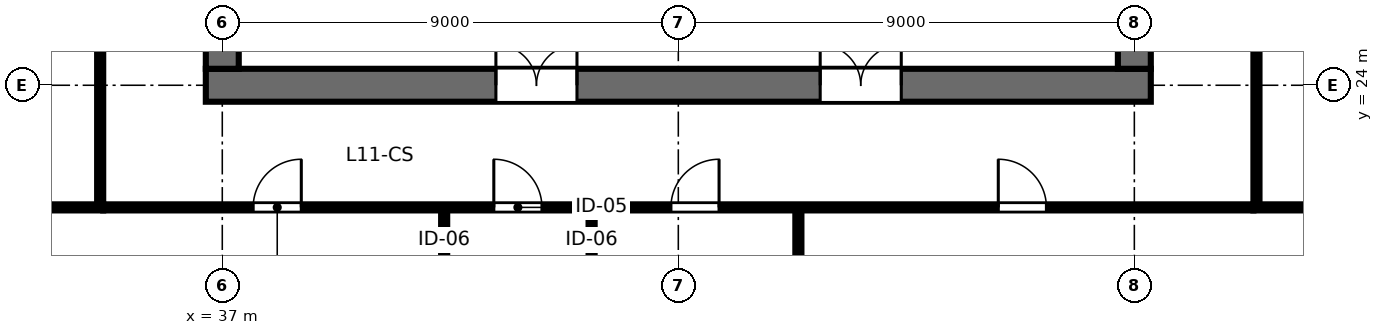
"""IFC4 building model, lengths in metres.
Left out: names, types, materials, properties, quantities, classifications, styles, units other than length and angle.
Written with IfcOpenShell. Run it as: python <this file> out.ifc"""

import sys

from ifc_helpers import new_model, si_unit, direction, frame, frame_2d, origin, place, context, subcontext, project, spatial, rectangle, extrude, element, fill, save


model = new_model("IFC4")
c1 = context("Model", 3, precision=1e-05, world=origin(), true_north=direction((0.0, 1.0)))
c2 = subcontext(c1, "Body", "Model", "MODEL_VIEW")
j1 = project(units=[si_unit("LENGTHUNIT", "METRE"), si_unit("PLANEANGLEUNIT", "RADIAN")], contexts=[c1])
p1 = place(None, origin())
s1 = spatial("IfcSite", under=j1, at=p1, CompositionType="ELEMENT")
p2 = place(p1, origin())
s2 = spatial("IfcBuilding", under=s1, at=p2, CompositionType="ELEMENT")
p3 = place(p2, frame((0.0, 0.0, 46.0)))
s3 = spatial("IfcBuildingStorey", under=s2, at=p3, CompositionType="ELEMENT", Elevation=46.0)
p4 = place(p3, frame((36.675, 24.0, 0.0), z_axis=(0.0, 0.0, 1.0), x_axis=(1.0, 0.0, 0.0)))
e1 = element("IfcWall", 1, at=p4, inside=s3, PredefinedType="SHEAR", context=c2, shape_type="SweptSolid", body=[
    extrude(rectangle(XDim=18.65, YDim=0.65, at=frame_2d((9.325, 0.0))), origin(), (0.0, 0.0, 1.0), 3.36),
])
p5 = place(p4, frame((5.725, 0.0, 0.0)))
e2 = element("IfcOpeningElement", 2, at=p5, cuts=e1, PredefinedType="OPENING", context=c2, shape_type="SweptSolid", body=[
    extrude(rectangle(XDim=1.6, YDim=2.15, at=frame_2d((0.8, 1.075))), frame((0.0, 0.335, 0.0), z_axis=(0.0, -1.0, 0.0), x_axis=(1.0, 0.0, 0.0)), (0.0, 0.0, 1.0), 0.67),
])
p6 = place(p4, frame((12.125, 0.0, 0.0)))
e3 = element("IfcOpeningElement", 3, at=p6, cuts=e1, PredefinedType="OPENING", context=c2, shape_type="SweptSolid", body=[
    extrude(rectangle(XDim=1.6, YDim=2.15, at=frame_2d((0.8, 1.075))), frame((0.0, 0.335, 0.0), z_axis=(0.0, -1.0, 0.0), x_axis=(1.0, 0.0, 0.0)), (0.0, 0.0, 1.0), 0.67),
])
p7 = place(p3, frame((37.0, 24.325, 0.0), z_axis=(0.0, 0.0, 1.0), x_axis=(0.0, 1.0, 0.0)))
e4 = element("IfcWall", 4, at=p7, inside=s3, PredefinedType="SHEAR", context=c2, shape_type="SweptSolid", body=[
    extrude(rectangle(XDim=15.35, YDim=0.65, at=frame_2d((7.675, 0.0))), origin(), (0.0, 0.0, 1.0), 3.36),
])
p8 = place(p7, frame((5.2, 0.0, 0.0)))
e5 = element("IfcOpeningElement", 5, at=p8, cuts=e4, PredefinedType="OPENING", context=c2, shape_type="SweptSolid", body=[
    extrude(rectangle(XDim=1.15, YDim=2.15, at=frame_2d((0.575, 1.075))), frame((0.0, 0.335, 0.0), z_axis=(0.0, -1.0, 0.0), x_axis=(1.0, 0.0, 0.0)), (0.0, 0.0, 1.0), 0.67),
])
p9 = place(p3, frame((55.0, 24.325, 0.0), z_axis=(0.0, 0.0, 1.0), x_axis=(0.0, 1.0, 0.0)))
e6 = element("IfcWall", 6, at=p9, inside=s3, PredefinedType="SHEAR", context=c2, shape_type="SweptSolid", body=[
    extrude(rectangle(XDim=15.35, YDim=0.65, at=frame_2d((7.675, 0.0))), origin(), (0.0, 0.0, 1.0), 3.36),
])
p10 = place(p9, frame((5.2, 0.0, 0.0)))
e7 = element("IfcOpeningElement", 7, at=p10, cuts=e6, PredefinedType="OPENING", context=c2, shape_type="SweptSolid", body=[
    extrude(rectangle(XDim=1.15, YDim=2.15, at=frame_2d((0.575, 1.075))), frame((0.0, 0.335, 0.0), z_axis=(0.0, -1.0, 0.0), x_axis=(1.0, 0.0, 0.0)), (0.0, 0.0, 1.0), 0.67),
])
p11 = place(p3, frame((41.379, 21.59, 0.0), z_axis=(0.0, 0.0, 1.0), x_axis=(0.0, -1.0, 0.0)))
e8 = element("IfcWall", 8, at=p11, inside=s3, PredefinedType="PARTITIONING", context=c2, shape_type="SweptSolid", body=[
    extrude(rectangle(XDim=10.51, YDim=0.12, at=frame_2d((5.255, 0.0))), origin(), (0.0, 0.0, 1.0), 2.43),
])
p12 = place(p11, frame((1.4, 0.0, 0.0)))
e9 = element("IfcOpeningElement", 9, at=p12, cuts=e8, PredefinedType="OPENING", context=c2, shape_type="SweptSolid", body=[
    extrude(rectangle(XDim=0.9, YDim=2.15, at=frame_2d((0.45, 1.075))), frame((0.0, 0.07, 0.0), z_axis=(0.0, -1.0, 0.0), x_axis=(1.0, 0.0, 0.0)), (0.0, 0.0, 1.0), 0.14),
])
p13 = place(p3, frame((44.289, 21.59, 0.0), z_axis=(0.0, 0.0, 1.0), x_axis=(0.0, -1.0, 0.0)))
e10 = element("IfcWall", 10, at=p13, inside=s3, PredefinedType="PARTITIONING", context=c2, shape_type="SweptSolid", body=[
    extrude(rectangle(XDim=10.51, YDim=0.12, at=frame_2d((5.255, 0.0))), origin(), (0.0, 0.0, 1.0), 2.43),
])
p14 = place(p13, frame((1.4, 0.0, 0.0)))
e11 = element("IfcOpeningElement", 11, at=p14, cuts=e10, PredefinedType="OPENING", context=c2, shape_type="SweptSolid", body=[
    extrude(rectangle(XDim=0.9, YDim=2.15, at=frame_2d((0.45, 1.075))), frame((0.0, 0.07, 0.0), z_axis=(0.0, -1.0, 0.0), x_axis=(1.0, 0.0, 0.0)), (0.0, 0.0, 1.0), 0.14),
])
p15 = place(p3, frame((48.37, 21.59, 0.0), z_axis=(0.0, 0.0, 1.0), x_axis=(0.0, -1.0, 0.0)))
e12 = element("IfcWall", 12, at=p15, inside=s3, PredefinedType="PARTITIONING", context=c2, shape_type="SweptSolid", body=[
    extrude(rectangle(XDim=10.51, YDim=0.12, at=frame_2d((5.255, 0.0))), origin(), (0.0, 0.0, 1.0), 2.43),
])
p16 = place(p15, frame((1.4, 0.0, 0.0)))
e13 = element("IfcOpeningElement", 13, at=p16, cuts=e12, PredefinedType="OPENING", context=c2, shape_type="SweptSolid", body=[
    extrude(rectangle(XDim=0.9, YDim=2.15, at=frame_2d((0.45, 1.075))), frame((0.0, 0.07, 0.0), z_axis=(0.0, -1.0, 0.0), x_axis=(1.0, 0.0, 0.0)), (0.0, 0.0, 1.0), 0.14),
])
p17 = place(p3, frame((34.65, 21.59, 0.0), z_axis=(0.0, 0.0, 1.0), x_axis=(1.0, 0.0, 0.0)))
e14 = element("IfcWall", 14, at=p17, inside=s3, PredefinedType="PARTITIONING", context=c2, shape_type="SweptSolid", body=[
    extrude(rectangle(XDim=22.7, YDim=0.12, at=frame_2d((11.35, 0.0))), origin(), (0.0, 0.0, 1.0), 2.43),
])
p18 = place(p17, frame((2.959, 0.0, 0.0)))
e15 = element("IfcOpeningElement", 15, at=p18, cuts=e14, PredefinedType="OPENING", context=c2, shape_type="SweptSolid", body=[
    extrude(rectangle(XDim=0.95, YDim=2.15, at=frame_2d((0.475, 1.075))), frame((0.0, 0.07, 0.0), z_axis=(0.0, -1.0, 0.0), x_axis=(1.0, 0.0, 0.0)), (0.0, 0.0, 1.0), 0.14),
])
p19 = place(p17, frame((7.709, 0.0, 0.0)))
e16 = element("IfcOpeningElement", 16, at=p19, cuts=e14, PredefinedType="OPENING", context=c2, shape_type="SweptSolid", body=[
    extrude(rectangle(XDim=0.95, YDim=2.15, at=frame_2d((0.475, 1.075))), frame((0.0, 0.07, 0.0), z_axis=(0.0, -1.0, 0.0), x_axis=(1.0, 0.0, 0.0)), (0.0, 0.0, 1.0), 0.14),
])
p20 = place(p17, frame((11.204, 0.0, 0.0)))
e17 = element("IfcOpeningElement", 17, at=p20, cuts=e14, PredefinedType="OPENING", context=c2, shape_type="SweptSolid", body=[
    extrude(rectangle(XDim=0.95, YDim=2.15, at=frame_2d((0.475, 1.075))), frame((0.0, 0.07, 0.0), z_axis=(0.0, -1.0, 0.0), x_axis=(1.0, 0.0, 0.0)), (0.0, 0.0, 1.0), 0.14),
])
p21 = place(p17, frame((17.665, 0.0, 0.0)))
e18 = element("IfcOpeningElement", 18, at=p21, cuts=e14, PredefinedType="OPENING", context=c2, shape_type="SweptSolid", body=[
    extrude(rectangle(XDim=0.95, YDim=2.15, at=frame_2d((0.475, 1.075))), frame((0.0, 0.07, 0.0), z_axis=(0.0, -1.0, 0.0), x_axis=(1.0, 0.0, 0.0)), (0.0, 0.0, 1.0), 0.14),
])
p22 = place(p3, frame((34.59, 21.65, 0.0), z_axis=(0.0, 0.0, 1.0), x_axis=(0.0, 1.0, 0.0)))
e19 = element("IfcWall", 19, at=p22, inside=s3, PredefinedType="PARTITIONING", context=c2, shape_type="SweptSolid", body=[
    extrude(rectangle(XDim=20.7, YDim=0.12, at=frame_2d((10.35, 0.0))), origin(), (0.0, 0.0, 1.0), 2.43),
])
p23 = place(p22, frame((3.402, 0.0, 0.0)))
e20 = element("IfcOpeningElement", 20, at=p23, cuts=e19, PredefinedType="OPENING", context=c2, shape_type="SweptSolid", body=[
    extrude(rectangle(XDim=0.95, YDim=2.15, at=frame_2d((0.475, 1.075))), frame((0.0, 0.07, 0.0), z_axis=(0.0, -1.0, 0.0), x_axis=(1.0, 0.0, 0.0)), (0.0, 0.0, 1.0), 0.14),
])
p24 = place(p22, frame((9.912, 0.0, 0.0)))
e21 = element("IfcOpeningElement", 21, at=p24, cuts=e19, PredefinedType="OPENING", context=c2, shape_type="SweptSolid", body=[
    extrude(rectangle(XDim=0.95, YDim=2.15, at=frame_2d((0.475, 1.075))), frame((0.0, 0.07, 0.0), z_axis=(0.0, -1.0, 0.0), x_axis=(1.0, 0.0, 0.0)), (0.0, 0.0, 1.0), 0.14),
])
p25 = place(p22, frame((16.385, 0.0, 0.0)))
e22 = element("IfcOpeningElement", 22, at=p25, cuts=e19, PredefinedType="OPENING", context=c2, shape_type="SweptSolid", body=[
    extrude(rectangle(XDim=0.95, YDim=2.15, at=frame_2d((0.475, 1.075))), frame((0.0, 0.07, 0.0), z_axis=(0.0, -1.0, 0.0), x_axis=(1.0, 0.0, 0.0)), (0.0, 0.0, 1.0), 0.14),
])
p26 = place(p3, frame((57.41, 21.65, 0.0), z_axis=(0.0, 0.0, 1.0), x_axis=(0.0, 1.0, 0.0)))
e23 = element("IfcWall", 23, at=p26, inside=s3, PredefinedType="PARTITIONING", context=c2, shape_type="SweptSolid", body=[
    extrude(rectangle(XDim=20.7, YDim=0.12, at=frame_2d((10.35, 0.0))), origin(), (0.0, 0.0, 1.0), 2.43),
])
p27 = place(p26, frame((9.875, 0.0, 0.0)))
e24 = element("IfcOpeningElement", 24, at=p27, cuts=e23, PredefinedType="OPENING", context=c2, shape_type="SweptSolid", body=[
    extrude(rectangle(XDim=0.95, YDim=2.15, at=frame_2d((0.475, 1.075))), frame((0.0, 0.07, 0.0), z_axis=(0.0, -1.0, 0.0), x_axis=(1.0, 0.0, 0.0)), (0.0, 0.0, 1.0), 0.14),
])
for number, where, z_axis, x_axis in (
    (25, (34.65, 21.59, 0.0), (0.0, 0.0, 1.0), (-1.0, 0.0, 0.0)),
    (26, (57.35, 21.59, 0.0), (0.0, 0.0, 1.0), (1.0, 0.0, 0.0)),
):
    element("IfcWall", number, at=place(p3, frame(where, z_axis=z_axis, x_axis=x_axis)), inside=s3, PredefinedType="PARTITIONING", context=c2, shape_type="SweptSolid", body=[
        extrude(rectangle(XDim=12.42, YDim=0.12, at=frame_2d((6.21, 0.0))), origin(), (0.0, 0.0, 1.0), 2.43),
    ])
p28 = place(p5, origin())
e27 = element("IfcDoor", 27, at=p28, inside=s3, OperationType="DOUBLE_DOOR_SINGLE_SWING", PredefinedType="DOOR", context=c2, shape_type="SweptSolid", body=[
    extrude(rectangle(XDim=1.6, YDim=2.15, at=frame_2d((0.8, 1.075))), frame((0.0, 0.025, 0.0), z_axis=(0.0, -1.0, 0.0), x_axis=(1.0, 0.0, 0.0)), (0.0, 0.0, 1.0), 0.05),
])
fill(e2, e27)
p29 = place(p6, origin())
e28 = element("IfcDoor", 28, at=p29, inside=s3, OperationType="DOUBLE_DOOR_SINGLE_SWING", PredefinedType="DOOR", context=c2, shape_type="SweptSolid", body=[
    extrude(rectangle(XDim=1.6, YDim=2.15, at=frame_2d((0.8, 1.075))), frame((0.0, 0.025, 0.0), z_axis=(0.0, -1.0, 0.0), x_axis=(1.0, 0.0, 0.0)), (0.0, 0.0, 1.0), 0.05),
])
fill(e3, e28)
p30 = place(p18, origin())
e29 = element("IfcDoor", 29, at=p30, inside=s3, OperationType="SINGLE_SWING_RIGHT", PredefinedType="DOOR", context=c2, shape_type="SweptSolid", body=[
    extrude(rectangle(XDim=0.95, YDim=2.15, at=frame_2d((0.475, 1.075))), frame((0.0, 0.025, 0.0), z_axis=(0.0, -1.0, 0.0), x_axis=(1.0, 0.0, 0.0)), (0.0, 0.0, 1.0), 0.05),
])
fill(e15, e29)
p31 = place(p19, origin())
e30 = element("IfcDoor", 30, at=p31, inside=s3, OperationType="SINGLE_SWING_LEFT", PredefinedType="DOOR", context=c2, shape_type="SweptSolid", body=[
    extrude(rectangle(XDim=0.95, YDim=2.15, at=frame_2d((0.475, 1.075))), frame((0.0, 0.025, 0.0), z_axis=(0.0, -1.0, 0.0), x_axis=(1.0, 0.0, 0.0)), (0.0, 0.0, 1.0), 0.05),
])
fill(e16, e30)
p32 = place(p20, origin())
e31 = element("IfcDoor", 31, at=p32, inside=s3, OperationType="SINGLE_SWING_RIGHT", PredefinedType="DOOR", context=c2, shape_type="SweptSolid", body=[
    extrude(rectangle(XDim=0.95, YDim=2.15, at=frame_2d((0.475, 1.075))), frame((0.0, 0.025, 0.0), z_axis=(0.0, -1.0, 0.0), x_axis=(1.0, 0.0, 0.0)), (0.0, 0.0, 1.0), 0.05),
])
fill(e17, e31)
p33 = place(p21, origin())
e32 = element("IfcDoor", 32, at=p33, inside=s3, OperationType="SINGLE_SWING_LEFT", PredefinedType="DOOR", context=c2, shape_type="SweptSolid", body=[
    extrude(rectangle(XDim=0.95, YDim=2.15, at=frame_2d((0.475, 1.075))), frame((0.0, 0.025, 0.0), z_axis=(0.0, -1.0, 0.0), x_axis=(1.0, 0.0, 0.0)), (0.0, 0.0, 1.0), 0.05),
])
fill(e18, e32)
save(model, sys.argv[1])
